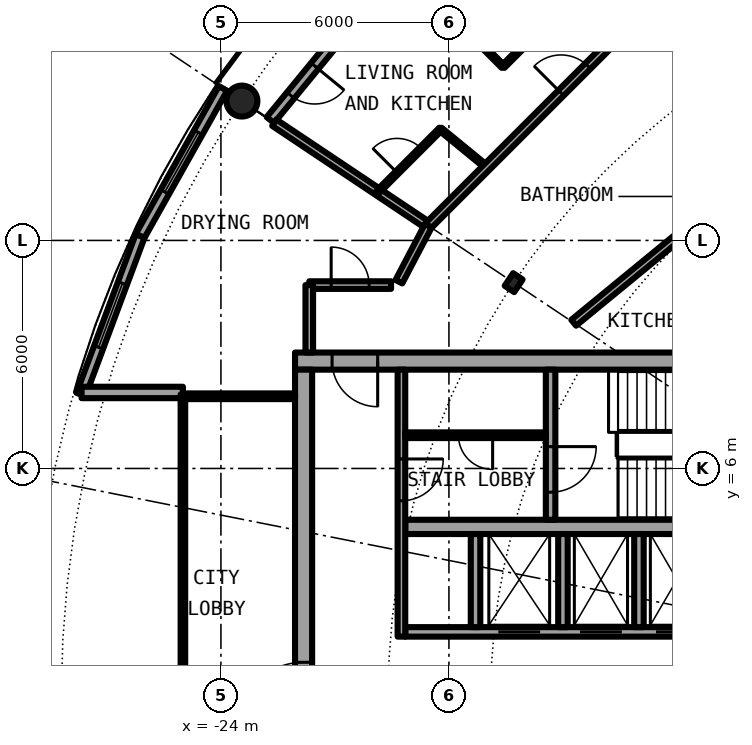
"""IFC4 building model, lengths in metres.
Left out: names, types, materials, properties, quantities, classifications, styles, units other than length and angle.
Written with IfcOpenShell. Run it as: python <this file> out.ifc"""

import sys

from ifc_helpers import new_model, si_unit, direction, frame, frame_2d, origin, origin_2d, place, context, subcontext, project, spatial, rectangle, hollow_circle, i_section, extrude, element, fill, save


model = new_model("IFC4")
c1 = context("Model", 3, precision=1e-05, world=origin(), true_north=direction((0.0, 1.0)))
c2 = subcontext(c1, "Body", "Model", "MODEL_VIEW")
j1 = project(units=[si_unit("LENGTHUNIT", "METRE"), si_unit("PLANEANGLEUNIT", "RADIAN")], contexts=[c1])
p1 = place(None, origin())
s1 = spatial("IfcSite", under=j1, at=p1, CompositionType="ELEMENT")
p2 = place(p1, origin())
s2 = spatial("IfcBuilding", under=s1, at=p2, CompositionType="ELEMENT")
p3 = place(p2, frame((0.0, 0.0, 202.4)))
s3 = spatial("IfcBuildingStorey", under=s2, at=p3, CompositionType="ELEMENT", Elevation=202.4)
p4 = place(p3, frame((-23.448, 15.667, 0.0), z_axis=(0.0, 0.0, 1.0), x_axis=(1.0, 0.0, 0.0)))
e1 = element("IfcColumn", 1, at=p4, inside=s3, PredefinedType="COLUMN", context=c2, shape_type="SweptSolid", body=[
    extrude(hollow_circle(Radius=0.406, WallThickness=0.03, at=origin_2d()), origin(), (0.0, 0.0, 1.0), 3.05),
])
p5 = place(p3, frame((-16.297, 10.889, 0.0), z_axis=(0.0, 0.0, 1.0), x_axis=(-0.831469612303, 0.55557023302, 0.0)))
e2 = element("IfcColumn", 2, at=p5, inside=s3, PredefinedType="COLUMN", context=c2, shape_type="SweptSolid", body=[
    extrude(i_section(OverallWidth=0.3, OverallDepth=0.4, WebThickness=0.013, FlangeThickness=0.024, FilletRadius=0.027, at=origin_2d()), origin(), (0.0, 0.0, 1.0), 3.05),
])
p6 = place(p3, frame((-19.304, 19.304, 0.0), z_axis=(0.0, 0.0, 1.0), x_axis=(-0.634382322723, -0.773019449054, 0.0)))
e3 = element("IfcWall", 3, at=p6, inside=s3, PredefinedType="SOLIDWALL", context=c2, shape_type="SweptSolid", body=[
    extrude(rectangle(XDim=5.352, YDim=0.25, at=frame_2d((2.676, 0.0))), origin(), (0.0, 0.0, 1.0), 2.7),
])
p7 = place(p6, frame((0.441, 0.0, 0.3)))
e4 = element("IfcOpeningElement", 4, at=p7, cuts=e3, PredefinedType="OPENING", context=c2, shape_type="SweptSolid", body=[
    extrude(rectangle(XDim=1.8, YDim=2.1, at=frame_2d((0.9, 1.05))), frame((0.0, 0.135, 0.0), z_axis=(0.0, -1.0, 0.0), x_axis=(1.0, 0.0, 0.0)), (0.0, 0.0, 1.0), 0.27),
])
p8 = place(p6, frame((3.51, 0.0, 0.0)))
e5 = element("IfcOpeningElement", 5, at=p8, cuts=e3, PredefinedType="OPENING", context=c2, shape_type="SweptSolid", body=[
    extrude(rectangle(XDim=1.0, YDim=2.2, at=frame_2d((0.5, 1.1))), frame((0.0, 0.135, 0.0), z_axis=(0.0, -1.0, 0.0), x_axis=(1.0, 0.0, 0.0)), (0.0, 0.0, 1.0), 0.27),
])
p9 = place(p3, frame((-23.946, 16.0, 0.0), z_axis=(0.0, 0.0, 1.0), x_axis=(-0.489696356642, -0.871893042919, 0.0)))
e6 = element("IfcWall", 6, at=p9, inside=s3, PredefinedType="SOLIDWALL", context=c2, shape_type="SweptSolid", body=[
    extrude(rectangle(XDim=4.454, YDim=0.25, at=frame_2d((2.227, 0.0))), origin(), (0.0, 0.0, 1.0), 2.7),
])
p10 = place(p9, frame((1.327, 0.0, 0.3)))
e7 = element("IfcOpeningElement", 7, at=p10, cuts=e6, PredefinedType="OPENING", context=c2, shape_type="SweptSolid", body=[
    extrude(rectangle(XDim=1.8, YDim=2.1, at=frame_2d((0.9, 1.05))), frame((0.0, 0.135, 0.0), z_axis=(0.0, -1.0, 0.0), x_axis=(1.0, 0.0, 0.0)), (0.0, 0.0, 1.0), 0.27),
])
p11 = place(p3, frame((-26.127, 12.117, 0.0), z_axis=(0.0, 0.0, 1.0), x_axis=(-0.349247811493, -0.937030397675, 0.0)))
e8 = element("IfcWall", 8, at=p11, inside=s3, PredefinedType="SOLIDWALL", context=c2, shape_type="SweptSolid", body=[
    extrude(rectangle(XDim=4.452, YDim=0.25, at=frame_2d((2.226, 0.0))), origin(), (0.0, 0.0, 1.0), 2.7),
])
p12 = place(p11, frame((1.327, 0.0, 0.3)))
e9 = element("IfcOpeningElement", 9, at=p12, cuts=e8, PredefinedType="OPENING", context=c2, shape_type="SweptSolid", body=[
    extrude(rectangle(XDim=1.8, YDim=2.1, at=frame_2d((0.9, 1.05))), frame((0.0, 0.135, 0.0), z_axis=(0.0, -1.0, 0.0), x_axis=(1.0, 0.0, 0.0)), (0.0, 0.0, 1.0), 0.27),
])
p13 = place(p3, frame((-25.0, 8.0, 0.0), z_axis=(0.0, 0.0, 1.0), x_axis=(-1.0, 0.0, 0.0)))
e10 = element("IfcWall", 10, at=p13, inside=s3, PredefinedType="SOLIDWALL", context=c2, shape_type="SweptSolid", body=[
    extrude(rectangle(XDim=2.667, YDim=0.3, at=frame_2d((1.333, 0.0))), origin(), (0.0, 0.0, 1.0), 2.7),
])
p14 = place(p3, frame((-8.55, 8.825, 0.0), z_axis=(0.0, 0.0, 1.0), x_axis=(-1.0, 0.0, 0.0)))
e11 = element("IfcWall", 11, at=p14, inside=s3, PredefinedType="SHEAR", context=c2, shape_type="SweptSolid", body=[
    extrude(rectangle(XDim=13.5, YDim=0.45, at=frame_2d((6.75, 0.0))), origin(), (0.0, 0.0, 1.0), 3.05),
])
p15 = place(p14, frame((11.325, 0.0, 0.0)))
e12 = element("IfcOpeningElement", 12, at=p15, cuts=e11, PredefinedType="OPENING", context=c2, shape_type="SweptSolid", body=[
    extrude(rectangle(XDim=1.2, YDim=2.3, at=frame_2d((0.6, 1.15))), frame((0.0, 0.235, 0.0), z_axis=(0.0, -1.0, 0.0), x_axis=(1.0, 0.0, 0.0)), (0.0, 0.0, 1.0), 0.47),
])
p16 = place(p3, frame((-21.825, -8.6, 0.0), z_axis=(0.0, 0.0, 1.0), x_axis=(0.0, 1.0, 0.0)))
e13 = element("IfcWall", 13, at=p16, inside=s3, PredefinedType="SHEAR", context=c2, shape_type="SweptSolid", body=[
    extrude(rectangle(XDim=17.2, YDim=0.45, at=frame_2d((8.6, 0.0))), origin(), (0.0, 0.0, 1.0), 3.05),
])
p17 = place(p16, frame((7.7, 0.0, 0.0)))
e14 = element("IfcOpeningElement", 14, at=p17, cuts=e13, PredefinedType="OPENING", context=c2, shape_type="SweptSolid", body=[
    extrude(rectangle(XDim=1.8, YDim=2.3, at=frame_2d((0.9, 1.15))), frame((0.0, 0.235, 0.0), z_axis=(0.0, -1.0, 0.0), x_axis=(1.0, 0.0, 0.0)), (0.0, 0.0, 1.0), 0.47),
])
p18 = place(p3, frame((-9.0, 1.7, 0.0), z_axis=(0.0, 0.0, 1.0), x_axis=(-1.0, 0.0, 0.0)))
e15 = element("IfcWall", 15, at=p18, inside=s3, PredefinedType="SHEAR", context=c2, shape_type="SweptSolid", body=[
    extrude(rectangle(XDim=10.15, YDim=0.25, at=frame_2d((5.075, 0.0))), origin(), (0.0, 0.0, 1.0), 3.05),
])
p19 = place(p18, frame((0.387, 0.0, 0.0)))
e16 = element("IfcOpeningElement", 16, at=p19, cuts=e15, PredefinedType="OPENING", context=c2, shape_type="SweptSolid", body=[
    extrude(rectangle(XDim=1.1, YDim=2.3, at=frame_2d((0.55, 1.15))), frame((0.0, 0.135, 0.0), z_axis=(0.0, -1.0, 0.0), x_axis=(1.0, 0.0, 0.0)), (0.0, 0.0, 1.0), 0.27),
])
p20 = place(p18, frame((2.45, 0.0, 0.0)))
e17 = element("IfcOpeningElement", 17, at=p20, cuts=e15, PredefinedType="OPENING", context=c2, shape_type="SweptSolid", body=[
    extrude(rectangle(XDim=1.1, YDim=2.3, at=frame_2d((0.55, 1.15))), frame((0.0, 0.135, 0.0), z_axis=(0.0, -1.0, 0.0), x_axis=(1.0, 0.0, 0.0)), (0.0, 0.0, 1.0), 0.27),
])
p21 = place(p18, frame((4.45, 0.0, 0.0)))
e18 = element("IfcOpeningElement", 18, at=p21, cuts=e15, PredefinedType="OPENING", context=c2, shape_type="SweptSolid", body=[
    extrude(rectangle(XDim=1.1, YDim=2.3, at=frame_2d((0.55, 1.15))), frame((0.0, 0.135, 0.0), z_axis=(0.0, -1.0, 0.0), x_axis=(1.0, 0.0, 0.0)), (0.0, 0.0, 1.0), 0.27),
])
p22 = place(p18, frame((6.6, 0.0, 0.0)))
e19 = element("IfcOpeningElement", 19, at=p22, cuts=e15, PredefinedType="OPENING", context=c2, shape_type="SweptSolid", body=[
    extrude(rectangle(XDim=1.1, YDim=2.3, at=frame_2d((0.55, 1.15))), frame((0.0, 0.135, 0.0), z_axis=(0.0, -1.0, 0.0), x_axis=(1.0, 0.0, 0.0)), (0.0, 0.0, 1.0), 0.27),
])
p23 = place(p3, frame((-9.0, 4.462, 0.0), z_axis=(0.0, 0.0, 1.0), x_axis=(-1.0, 0.0, 0.0)))
e20 = element("IfcWall", 20, at=p23, inside=s3, PredefinedType="SHEAR", context=c2, shape_type="SweptSolid", body=[
    extrude(rectangle(XDim=10.15, YDim=0.375, at=frame_2d((5.075, 0.0))), origin(), (0.0, 0.0, 1.0), 3.05),
])
p24 = place(p3, frame((-15.325, 8.6, 0.0), z_axis=(0.0, 0.0, 1.0), x_axis=(0.0, -1.0, 0.0)))
e21 = element("IfcWall", 21, at=p24, inside=s3, PredefinedType="SHEAR", context=c2, shape_type="SweptSolid", body=[
    extrude(rectangle(XDim=3.95, YDim=0.25, at=frame_2d((1.975, 0.0))), origin(), (0.0, 0.0, 1.0), 3.05),
])
p25 = place(p24, frame((2.025, 0.0, 0.0)))
e22 = element("IfcOpeningElement", 22, at=p25, cuts=e21, PredefinedType="OPENING", context=c2, shape_type="SweptSolid", body=[
    extrude(rectangle(XDim=1.2, YDim=2.3, at=frame_2d((0.6, 1.15))), frame((0.0, 0.135, 0.0), z_axis=(0.0, -1.0, 0.0), x_axis=(1.0, 0.0, 0.0)), (0.0, 0.0, 1.0), 0.27),
])
for number, where, z_axis, x_axis in (
    (23, (-15.0, 1.825, 0.0), (0.0, 0.0, 1.0), (0.0, 1.0, 0.0)),
    (24, (-17.3, 1.825, 0.0), (0.0, 0.0, 1.0), (0.0, 1.0, 0.0)),
):
    element("IfcWall", number, at=place(p3, frame(where, z_axis=z_axis, x_axis=x_axis)), inside=s3, PredefinedType="SOLIDWALL", context=c2, shape_type="SweptSolid", body=[
        extrude(rectangle(XDim=2.45, YDim=0.25, at=frame_2d((1.225, 0.0))), origin(), (0.0, 0.0, 1.0), 2.7),
    ])
p26 = place(p3, frame((-19.25, 8.6, 0.0), z_axis=(0.0, 0.0, 1.0), x_axis=(0.0, -1.0, 0.0)))
e25 = element("IfcWall", 25, at=p26, inside=s3, PredefinedType="SOLIDWALL", context=c2, shape_type="SweptSolid", body=[
    extrude(rectangle(XDim=7.025, YDim=0.2, at=frame_2d((3.513, 0.0))), origin(), (0.0, 0.0, 1.0), 2.7),
])
p27 = place(p26, frame((2.35, 0.0, 0.0)))
e26 = element("IfcOpeningElement", 26, at=p27, cuts=e25, PredefinedType="OPENING", context=c2, shape_type="SweptSolid", body=[
    extrude(rectangle(XDim=1.1, YDim=2.3, at=frame_2d((0.55, 1.15))), frame((0.0, 0.11, 0.0), z_axis=(0.0, -1.0, 0.0), x_axis=(1.0, 0.0, 0.0)), (0.0, 0.0, 1.0), 0.22),
])
p28 = place(p3, frame((-13.0, 1.825, 0.0), z_axis=(0.0, 0.0, 1.0), x_axis=(0.0, 1.0, 0.0)))
e27 = element("IfcWall", 27, at=p28, inside=s3, PredefinedType="SOLIDWALL", context=c2, shape_type="SweptSolid", body=[
    extrude(rectangle(XDim=2.45, YDim=0.25, at=frame_2d((1.225, 0.0))), origin(), (0.0, 0.0, 1.0), 2.7),
])
p29 = place(p3, frame((-15.45, 6.875, 0.0), z_axis=(0.0, 0.0, 1.0), x_axis=(-1.0, 0.0, 0.0)))
e28 = element("IfcWall", 28, at=p29, inside=s3, PredefinedType="PARTITIONING", context=c2, shape_type="SweptSolid", body=[
    extrude(rectangle(XDim=3.7, YDim=0.15, at=frame_2d((1.85, 0.0))), origin(), (0.0, 0.0, 1.0), 2.7),
])
p30 = place(p29, frame((1.4, 0.0, 0.0)))
e29 = element("IfcOpeningElement", 29, at=p30, cuts=e28, PredefinedType="OPENING", context=c2, shape_type="SweptSolid", body=[
    extrude(rectangle(XDim=0.9, YDim=2.3, at=frame_2d((0.45, 1.15))), frame((0.0, 0.085, 0.0), z_axis=(0.0, -1.0, 0.0), x_axis=(1.0, 0.0, 0.0)), (0.0, 0.0, 1.0), 0.17),
])
p31 = place(p3, frame((-22.05, 7.9, 0.0), z_axis=(0.0, 0.0, 1.0), x_axis=(-1.0, 0.0, 0.0)))
e30 = element("IfcWall", 30, at=p31, inside=s3, PredefinedType="PARTITIONING", context=c2, shape_type="SweptSolid", body=[
    extrude(rectangle(XDim=2.89, YDim=0.15, at=frame_2d((1.445, 0.0))), origin(), (0.0, 0.0, 1.0), 2.7),
])
p32 = place(p3, frame((-25.0, 7.95, 0.0), z_axis=(0.0, 0.0, 1.0), x_axis=(0.0, -1.0, 0.0)))
e31 = element("IfcWall", 31, at=p32, inside=s3, PredefinedType="PARTITIONING", context=c2, shape_type="SweptSolid", body=[
    extrude(rectangle(XDim=15.9, YDim=0.12, at=frame_2d((7.95, 0.0))), origin(), (0.0, 0.0, 1.0), 2.7),
])
p33 = place(p32, frame((0.95, 0.0, 0.1)))
e32 = element("IfcOpeningElement", 32, at=p33, cuts=e31, PredefinedType="OPENING", context=c2, shape_type="SweptSolid", body=[
    extrude(rectangle(XDim=14.0, YDim=2.35, at=frame_2d((7.0, 1.175))), frame((0.0, 0.07, 0.0), z_axis=(0.0, -1.0, 0.0), x_axis=(1.0, 0.0, 0.0)), (0.0, 0.0, 1.0), 0.14),
])
p34 = place(p3, frame((-18.224, 14.927, 0.0), z_axis=(0.0, 0.0, 1.0), x_axis=(0.773446828454, -0.633861186344, 0.0)))
e33 = element("IfcWall", 33, at=p34, inside=s3, PredefinedType="PARTITIONING", context=c2, shape_type="SweptSolid", body=[
    extrude(rectangle(XDim=1.578, YDim=0.1, at=frame_2d((0.789, 0.0))), origin(), (0.0, 0.0, 1.0), 2.7),
])
p35 = place(p3, frame((-22.595, 15.098, 0.0), z_axis=(0.0, 0.0, 1.0), x_axis=(0.831387096605, -0.55569370664, 0.0)))
e34 = element("IfcWall", 34, at=p35, inside=s3, PredefinedType="PARTITIONING", context=c2, shape_type="SweptSolid", body=[
    extrude(rectangle(XDim=4.875, YDim=0.2, at=frame_2d((2.438, 0.0))), origin(), (0.0, 0.0, 1.0), 2.7),
])
p36 = place(p3, frame((-19.216, 19.216, 0.0), z_axis=(0.0, 0.0, 1.0), x_axis=(0.707106781187, -0.707106781187, 0.0)))
e35 = element("IfcWall", 35, at=p36, inside=s3, PredefinedType="PARTITIONING", context=c2, shape_type="SweptSolid", body=[
    extrude(rectangle(XDim=3.735, YDim=0.1, at=frame_2d((1.868, 0.0))), origin(), (0.0, 0.0, 1.0), 2.7),
])
p37 = place(p36, frame((1.417, 0.0, 0.0)))
e36 = element("IfcOpeningElement", 36, at=p37, cuts=e35, PredefinedType="OPENING", context=c2, shape_type="SweptSolid", body=[
    extrude(rectangle(XDim=0.9, YDim=2.3, at=frame_2d((0.45, 1.15))), frame((0.0, 0.06, 0.0), z_axis=(0.0, -1.0, 0.0), x_axis=(1.0, 0.0, 0.0)), (0.0, 0.0, 1.0), 0.12),
])
p38 = place(p3, frame((-21.675, 10.825, 0.0), z_axis=(0.0, 0.0, 1.0), x_axis=(1.0, 0.0, 0.0)))
e37 = element("IfcWall", 37, at=p38, inside=s3, PredefinedType="PARTITIONING", context=c2, shape_type="SweptSolid", body=[
    extrude(rectangle(XDim=2.152, YDim=0.2, at=frame_2d((1.076, 0.0))), origin(), (0.0, 0.0, 1.0), 2.7),
])
p39 = place(p38, frame((0.576, 0.0, 0.0)))
e38 = element("IfcOpeningElement", 38, at=p39, cuts=e37, PredefinedType="OPENING", context=c2, shape_type="SweptSolid", body=[
    extrude(rectangle(XDim=1.0, YDim=2.3, at=frame_2d((0.5, 1.15))), frame((0.0, 0.11, 0.0), z_axis=(0.0, -1.0, 0.0), x_axis=(1.0, 0.0, 0.0)), (0.0, 0.0, 1.0), 0.22),
])
p40 = place(p3, frame((-14.717, 9.834, 0.0), z_axis=(0.0, 0.0, 1.0), x_axis=(0.773034536097, 0.634363938131, 0.0)))
e39 = element("IfcWall", 39, at=p40, inside=s3, PredefinedType="PARTITIONING", context=c2, shape_type="SweptSolid", body=[
    extrude(rectangle(XDim=10.277, YDim=0.2, at=frame_2d((5.138, 0.0))), origin(), (0.0, 0.0, 1.0), 2.7),
])
p41 = place(p40, frame((4.638, 0.0, 0.0)))
e40 = element("IfcOpeningElement", 40, at=p41, cuts=e39, PredefinedType="OPENING", context=c2, shape_type="SweptSolid", body=[
    extrude(rectangle(XDim=1.0, YDim=2.3, at=frame_2d((0.5, 1.15))), frame((0.0, 0.11, 0.0), z_axis=(0.0, -1.0, 0.0), x_axis=(1.0, 0.0, 0.0)), (0.0, 0.0, 1.0), 0.22),
])
p42 = place(p3, frame((-21.675, 9.05, 0.0), z_axis=(0.0, 0.0, 1.0), x_axis=(0.0, 1.0, 0.0)))
e41 = element("IfcWall", 41, at=p42, inside=s3, PredefinedType="PARTITIONING", context=c2, shape_type="SweptSolid", body=[
    extrude(rectangle(XDim=1.775, YDim=0.2, at=frame_2d((0.887, 0.0))), origin(), (0.0, 0.0, 1.0), 2.7),
])
p43 = place(p3, frame((-18.542, 12.389, 0.0), z_axis=(0.0, 0.0, 1.0), x_axis=(0.707106781187, 0.707106781187, 0.0)))
e42 = element("IfcWall", 42, at=p43, inside=s3, PredefinedType="PARTITIONING", context=c2, shape_type="SweptSolid", body=[
    extrude(rectangle(XDim=8.702, YDim=0.2, at=frame_2d((4.351, 0.0))), origin(), (0.0, 0.0, 1.0), 2.7),
])
p44 = place(p43, frame((4.938, 0.0, 0.0)))
e43 = element("IfcOpeningElement", 43, at=p44, cuts=e42, PredefinedType="OPENING", context=c2, shape_type="SweptSolid", body=[
    extrude(rectangle(XDim=1.0, YDim=2.3, at=frame_2d((0.5, 1.15))), frame((0.0, 0.11, 0.0), z_axis=(0.0, -1.0, 0.0), x_axis=(1.0, 0.0, 0.0)), (0.0, 0.0, 1.0), 0.22),
])
p45 = place(p3, frame((-19.317, 10.915, 0.0), z_axis=(0.0, 0.0, 1.0), x_axis=(0.465359652486, 0.885121683068, 0.0)))
e44 = element("IfcWall", 44, at=p45, inside=s3, PredefinedType="PARTITIONING", context=c2, shape_type="SweptSolid", body=[
    extrude(rectangle(XDim=1.665, YDim=0.2, at=frame_2d((0.833, 0.0))), origin(), (0.0, 0.0, 1.0), 2.7),
])
p46 = place(p3, frame((-19.867, 13.283, 0.0), z_axis=(0.0, 0.0, 1.0), x_axis=(0.707106781187, 0.707106781187, 0.0)))
e45 = element("IfcWall", 45, at=p46, inside=s3, PredefinedType="PARTITIONING", context=c2, shape_type="SweptSolid", body=[
    extrude(rectangle(XDim=2.332, YDim=0.1, at=frame_2d((1.166, 0.0))), origin(), (0.0, 0.0, 1.0), 2.7),
])
p47 = place(p46, frame((0.709, 0.0, 0.0)))
e46 = element("IfcOpeningElement", 46, at=p47, cuts=e45, PredefinedType="OPENING", context=c2, shape_type="SweptSolid", body=[
    extrude(rectangle(XDim=0.9, YDim=2.3, at=frame_2d((0.45, 1.15))), frame((0.0, 0.06, 0.0), z_axis=(0.0, -1.0, 0.0), x_axis=(1.0, 0.0, 0.0)), (0.0, 0.0, 1.0), 0.12),
])
p48 = place(p3, frame((-16.575, 16.575, 0.0), z_axis=(0.0, 0.0, 1.0), x_axis=(0.707080600289, 0.707132961115, 0.0)))
e47 = element("IfcWall", 47, at=p48, inside=s3, PredefinedType="PARTITIONING", context=c2, shape_type="SweptSolid", body=[
    extrude(rectangle(XDim=4.663, YDim=0.1, at=frame_2d((2.331, 0.0))), origin(), (0.0, 0.0, 1.0), 2.7),
])
p49 = place(p48, frame((3.043, 0.0, 0.0)))
e48 = element("IfcOpeningElement", 48, at=p49, cuts=e47, PredefinedType="OPENING", context=c2, shape_type="SweptSolid", body=[
    extrude(rectangle(XDim=0.9, YDim=2.3, at=frame_2d((0.45, 1.15))), frame((0.0, 0.06, 0.0), z_axis=(0.0, -1.0, 0.0), x_axis=(1.0, 0.0, 0.0)), (0.0, 0.0, 1.0), 0.12),
])
p50 = place(p8, origin())
e49 = element("IfcDoor", 49, at=p50, inside=s3, OperationType="SINGLE_SWING_LEFT", PredefinedType="DOOR", context=c2, shape_type="SweptSolid", body=[
    extrude(rectangle(XDim=1.0, YDim=2.2, at=frame_2d((0.5, 1.1))), frame((0.0, 0.025, 0.0), z_axis=(0.0, -1.0, 0.0), x_axis=(1.0, 0.0, 0.0)), (0.0, 0.0, 1.0), 0.05),
])
fill(e5, e49)
p51 = place(p10, origin())
e50 = element("IfcWindow", 50, at=p51, inside=s3, PartitioningType="SINGLE_PANEL", PredefinedType="WINDOW", context=c2, shape_type="SweptSolid", body=[
    extrude(rectangle(XDim=1.8, YDim=2.1, at=frame_2d((0.9, 1.05))), frame((0.0, 0.03, 0.0), z_axis=(0.0, -1.0, 0.0), x_axis=(1.0, 0.0, 0.0)), (0.0, 0.0, 1.0), 0.06),
])
fill(e7, e50)
p52 = place(p12, origin())
e51 = element("IfcWindow", 51, at=p52, inside=s3, PartitioningType="SINGLE_PANEL", PredefinedType="WINDOW", context=c2, shape_type="SweptSolid", body=[
    extrude(rectangle(XDim=1.8, YDim=2.1, at=frame_2d((0.9, 1.05))), frame((0.0, 0.03, 0.0), z_axis=(0.0, -1.0, 0.0), x_axis=(1.0, 0.0, 0.0)), (0.0, 0.0, 1.0), 0.06),
])
fill(e9, e51)
p53 = place(p20, origin())
e52 = element("IfcDoor", 52, at=p53, inside=s3, OperationType="DOUBLE_DOOR_SLIDING", PredefinedType="DOOR", context=c2, shape_type="SweptSolid", body=[
    extrude(rectangle(XDim=1.1, YDim=2.3, at=frame_2d((0.55, 1.15))), frame((0.0, 0.025, 0.0), z_axis=(0.0, -1.0, 0.0), x_axis=(1.0, 0.0, 0.0)), (0.0, 0.0, 1.0), 0.05),
])
fill(e17, e52)
p54 = place(p21, origin())
e53 = element("IfcDoor", 53, at=p54, inside=s3, OperationType="DOUBLE_DOOR_SLIDING", PredefinedType="DOOR", context=c2, shape_type="SweptSolid", body=[
    extrude(rectangle(XDim=1.1, YDim=2.3, at=frame_2d((0.55, 1.15))), frame((0.0, 0.025, 0.0), z_axis=(0.0, -1.0, 0.0), x_axis=(1.0, 0.0, 0.0)), (0.0, 0.0, 1.0), 0.05),
])
fill(e18, e53)
p55 = place(p22, origin())
e54 = element("IfcDoor", 54, at=p55, inside=s3, OperationType="DOUBLE_DOOR_SLIDING", PredefinedType="DOOR", context=c2, shape_type="SweptSolid", body=[
    extrude(rectangle(XDim=1.1, YDim=2.3, at=frame_2d((0.55, 1.15))), frame((0.0, 0.025, 0.0), z_axis=(0.0, -1.0, 0.0), x_axis=(1.0, 0.0, 0.0)), (0.0, 0.0, 1.0), 0.05),
])
fill(e19, e54)
p56 = place(p30, origin())
e55 = element("IfcDoor", 55, at=p56, inside=s3, OperationType="SINGLE_SWING_LEFT", PredefinedType="DOOR", context=c2, shape_type="SweptSolid", body=[
    extrude(rectangle(XDim=0.9, YDim=2.3, at=frame_2d((0.45, 1.15))), frame((0.0, 0.025, 0.0), z_axis=(0.0, -1.0, 0.0), x_axis=(1.0, 0.0, 0.0)), (0.0, 0.0, 1.0), 0.05),
])
fill(e29, e55)
p57 = place(p25, origin())
e56 = element("IfcDoor", 56, at=p57, inside=s3, OperationType="SINGLE_SWING_LEFT", PredefinedType="DOOR", context=c2, shape_type="SweptSolid", body=[
    extrude(rectangle(XDim=1.2, YDim=2.3, at=frame_2d((0.6, 1.15))), frame((0.0, 0.025, 0.0), z_axis=(0.0, -1.0, 0.0), x_axis=(1.0, 0.0, 0.0)), (0.0, 0.0, 1.0), 0.05),
])
fill(e22, e56)
p58 = place(p27, origin())
e57 = element("IfcDoor", 57, at=p58, inside=s3, OperationType="SINGLE_SWING_RIGHT", PredefinedType="DOOR", context=c2, shape_type="SweptSolid", body=[
    extrude(rectangle(XDim=1.1, YDim=2.3, at=frame_2d((0.55, 1.15))), frame((0.0, 0.025, 0.0), z_axis=(0.0, -1.0, 0.0), x_axis=(1.0, 0.0, 0.0)), (0.0, 0.0, 1.0), 0.05),
])
fill(e26, e57)
p59 = place(p15, origin())
e58 = element("IfcDoor", 58, at=p59, inside=s3, OperationType="SINGLE_SWING_LEFT", PredefinedType="DOOR", context=c2, shape_type="SweptSolid", body=[
    extrude(rectangle(XDim=1.2, YDim=2.3, at=frame_2d((0.6, 1.15))), frame((0.0, 0.025, 0.0), z_axis=(0.0, -1.0, 0.0), x_axis=(1.0, 0.0, 0.0)), (0.0, 0.0, 1.0), 0.05),
])
fill(e12, e58)
p60 = place(p17, origin())
e59 = element("IfcDoor", 59, at=p60, inside=s3, OperationType="SINGLE_SWING_LEFT", PredefinedType="DOOR", context=c2, shape_type="SweptSolid", body=[
    extrude(rectangle(XDim=1.8, YDim=2.3, at=frame_2d((0.9, 1.15))), frame((0.0, 0.025, 0.0), z_axis=(0.0, -1.0, 0.0), x_axis=(1.0, 0.0, 0.0)), (0.0, 0.0, 1.0), 0.05),
])
fill(e14, e59)
p61 = place(p33, origin())
e60 = element("IfcWindow", 60, at=p61, inside=s3, PartitioningType="SINGLE_PANEL", PredefinedType="WINDOW", context=c2, shape_type="SweptSolid", body=[
    extrude(rectangle(XDim=14.0, YDim=2.35, at=frame_2d((7.0, 1.175))), frame((0.0, 0.03, 0.0), z_axis=(0.0, -1.0, 0.0), x_axis=(1.0, 0.0, 0.0)), (0.0, 0.0, 1.0), 0.06),
])
fill(e32, e60)
p62 = place(p44, origin())
e61 = element("IfcDoor", 61, at=p62, inside=s3, OperationType="SINGLE_SWING_RIGHT", PredefinedType="DOOR", context=c2, shape_type="SweptSolid", body=[
    extrude(rectangle(XDim=1.0, YDim=2.3, at=frame_2d((0.5, 1.15))), frame((0.0, 0.025, 0.0), z_axis=(0.0, -1.0, 0.0), x_axis=(1.0, 0.0, 0.0)), (0.0, 0.0, 1.0), 0.05),
])
fill(e43, e61)
p63 = place(p47, origin())
e62 = element("IfcDoor", 62, at=p63, inside=s3, OperationType="SINGLE_SWING_LEFT", PredefinedType="DOOR", context=c2, shape_type="SweptSolid", body=[
    extrude(rectangle(XDim=0.9, YDim=2.3, at=frame_2d((0.45, 1.15))), frame((0.0, 0.025, 0.0), z_axis=(0.0, -1.0, 0.0), x_axis=(1.0, 0.0, 0.0)), (0.0, 0.0, 1.0), 0.05),
])
fill(e46, e62)
p64 = place(p39, origin())
e63 = element("IfcDoor", 63, at=p64, inside=s3, OperationType="SINGLE_SWING_LEFT", PredefinedType="DOOR", context=c2, shape_type="SweptSolid", body=[
    extrude(rectangle(XDim=1.0, YDim=2.3, at=frame_2d((0.5, 1.15))), frame((0.0, 0.025, 0.0), z_axis=(0.0, -1.0, 0.0), x_axis=(1.0, 0.0, 0.0)), (0.0, 0.0, 1.0), 0.05),
])
fill(e38, e63)
save(model, sys.argv[1])
